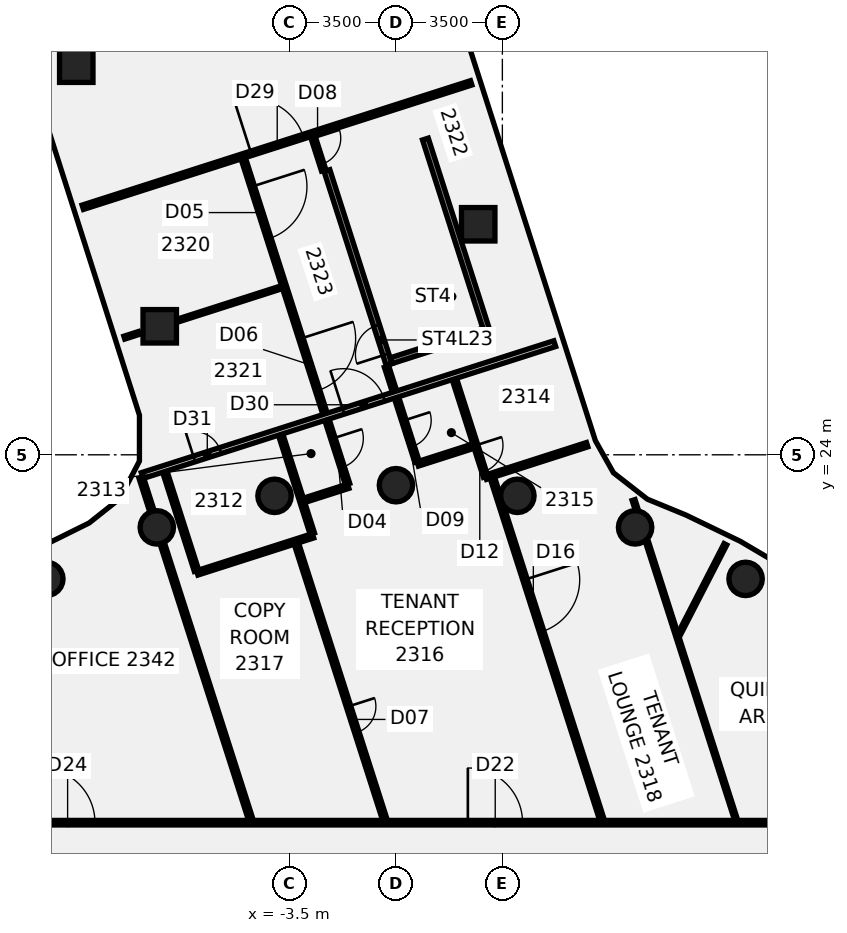
"""IFC4 building model, lengths in metres.
Left out: names, types, materials, properties, quantities, classifications, styles, units other than length and angle.
Written with IfcOpenShell. Run it as: python <this file> out.ifc"""

import sys

from ifc_helpers import new_model, si_unit, direction, frame, frame_2d, origin, origin_2d, place, context, subcontext, project, spatial, polyline, rectangle, circle, outline, extrude, element, fill, save


model = new_model("IFC4")
c1 = context("Model", 3, precision=1e-05, world=origin(), true_north=direction((0.0, 1.0)))
c2 = subcontext(c1, "Body", "Model", "MODEL_VIEW")
j1 = project(units=[si_unit("LENGTHUNIT", "METRE"), si_unit("PLANEANGLEUNIT", "RADIAN")], contexts=[c1])
p1 = place(None, origin())
s1 = spatial("IfcSite", under=j1, at=p1, CompositionType="ELEMENT")
p2 = place(p1, origin())
s2 = spatial("IfcBuilding", under=s1, at=p2, CompositionType="ELEMENT")
p3 = place(p2, frame((0.0, 0.0, 98.5)))
s3 = spatial("IfcBuildingStorey", under=s2, at=p3, CompositionType="ELEMENT", Elevation=98.5)
for number, where, z_axis, x_axis in (
    (1, (11.5, 19.919, -0.14), (0.0, 0.0, 1.0), (1.0, 0.0, 0.0)),
    (2, (7.866, 21.613, -0.14), (0.0, 0.0, 1.0), (1.0, 0.0, 0.0)),
    (3, (3.994, 22.651, -0.14), (0.0, 0.0, 1.0), (1.0, 0.0, 0.0)),
    (4, (0.0, 23.0, -0.14), (0.0, 0.0, 1.0), (1.0, 0.0, 0.0)),
    (5, (-3.994, 22.651, -0.14), (0.0, 0.0, 1.0), (1.0, 0.0, 0.0)),
    (6, (-7.866, 21.613, -0.14), (0.0, 0.0, 1.0), (1.0, 0.0, 0.0)),
    (7, (-11.5, 19.919, -0.14), (0.0, 0.0, 1.0), (1.0, 0.0, 0.0)),
):
    element("IfcColumn", number, at=place(p3, frame(where, z_axis=z_axis, x_axis=x_axis)), inside=s3, PredefinedType="COLUMN", context=c2, shape_type="SweptSolid", body=[
        extrude(circle(Radius=0.55, at=origin_2d()), origin(), (0.0, 0.0, 1.0), 3.75),
    ])
p4 = place(p3, frame((-10.515, 36.797, -0.138), z_axis=(-0.071203111001, -0.051536253541, 0.996129575685), x_axis=(0.949481128997, 0.302506380728, 0.083519310928)))
e8 = element("IfcColumn", 8, at=p4, inside=s3, PredefinedType="COLUMN", context=c2, shape_type="SweptSolid", body=[
    extrude(rectangle(XDim=1.1, YDim=1.1, at=origin_2d()), origin(), (0.0, 0.0, 1.0), 3.761),
])
for number, where, z_axis, x_axis in (
    (9, (-7.77, 28.227, -0.139), (-0.03, -0.038, 0.999), (0.952, 0.304, 0.04)),
    (10, (2.706, 31.582, -0.139), (-0.047, 0.013, 0.999), (0.305, -0.952, 0.026)),
):
    element("IfcColumn", number, at=place(p3, frame(where, z_axis=z_axis, x_axis=x_axis)), inside=s3, PredefinedType="COLUMN", context=c2, shape_type="SweptSolid", body=[
        extrude(rectangle(XDim=1.1, YDim=1.1, at=origin_2d()), origin(), (0.0, 0.0, 1.0), 3.752),
    ])
p5 = place(p3, frame((-8.381, 23.251, 0.0), z_axis=(0.0, 0.0, 1.0), x_axis=(0.305122152519, -0.952313221604, 0.0)))
e11 = element("IfcWall", 11, at=p5, inside=s3, PredefinedType="PARTITIONING", context=c2, shape_type="SweptSolid", body=[
    extrude(rectangle(XDim=1.176, YDim=0.15, at=frame_2d((0.588, 0.0))), origin(), (0.0, 0.0, 1.0), 3.01),
])
p6 = place(p3, frame((-7.692, 21.1, 0.0), z_axis=(0.0, 0.0, 1.0), x_axis=(0.305022732323, -0.952345070217, 0.0)))
e12 = element("IfcWall", 12, at=p6, inside=s3, PredefinedType="PARTITIONING", context=c2, shape_type="SweptSolid", body=[
    extrude(rectangle(XDim=9.575, YDim=0.15, at=frame_2d((4.788, 0.0))), origin(), (0.0, 0.0, 1.0), 3.01),
])
p7 = place(p3, frame((-7.604, 23.449, 0.0), z_axis=(0.0, 0.0, 1.0), x_axis=(0.305062851341, -0.952332219728, 0.0)))
e13 = element("IfcWall", 13, at=p7, inside=s3, PredefinedType="PARTITIONING", context=c2, shape_type="SweptSolid", body=[
    extrude(rectangle(XDim=3.425, YDim=0.15, at=frame_2d((1.712, 0.0))), origin(), (0.0, 0.0, 1.0), 3.01),
])
p8 = place(p3, frame((-5.025, 33.753, 0.0), z_axis=(0.0, 0.0, 1.0), x_axis=(0.305060744487, -0.952332894619, 0.0)))
e14 = element("IfcWall", 14, at=p8, inside=s3, PredefinedType="PARTITIONING", context=c2, shape_type="SweptSolid", body=[
    extrude(rectangle(XDim=11.251, YDim=0.15, at=frame_2d((5.625, 0.0))), origin(), (0.0, 0.0, 1.0), 3.01),
])
p9 = place(p8, frame((9.675, 0.0, 0.0)))
e15 = element("IfcOpeningElement", 15, at=p9, cuts=e14, PredefinedType="OPENING", context=c2, shape_type="SweptSolid", body=[
    extrude(rectangle(XDim=1.0, YDim=2.1, at=frame_2d((0.5, 1.05))), frame((0.0, 0.085, 0.0), z_axis=(0.0, -1.0, 0.0), x_axis=(1.0, 0.0, 0.0)), (0.0, 0.0, 1.0), 0.17),
])
p10 = place(p8, frame((0.975, 0.0, 0.0)))
e16 = element("IfcOpeningElement", 16, at=p10, cuts=e14, PredefinedType="OPENING", context=c2, shape_type="SweptSolid", body=[
    extrude(rectangle(XDim=1.8, YDim=2.1, at=frame_2d((0.9, 1.05))), frame((0.0, 0.085, 0.0), z_axis=(0.0, -1.0, 0.0), x_axis=(1.0, 0.0, 0.0)), (0.0, 0.0, 1.0), 0.17),
])
p11 = place(p8, frame((6.226, 0.0, 0.0)))
e17 = element("IfcOpeningElement", 17, at=p11, cuts=e14, PredefinedType="OPENING", context=c2, shape_type="SweptSolid", body=[
    extrude(rectangle(XDim=1.8, YDim=2.1, at=frame_2d((0.9, 1.05))), frame((0.0, 0.085, 0.0), z_axis=(0.0, -1.0, 0.0), x_axis=(1.0, 0.0, 0.0)), (0.0, 0.0, 1.0), 0.17),
])
p12 = place(p3, frame((-3.794, 24.665, 0.0), z_axis=(0.0, 0.0, 1.0), x_axis=(0.304920755811, -0.95237772584, 0.0)))
e18 = element("IfcWall", 18, at=p12, inside=s3, PredefinedType="PARTITIONING", context=c2, shape_type="SweptSolid", body=[
    extrude(rectangle(XDim=3.42, YDim=0.15, at=frame_2d((1.71, 0.0))), origin(), (0.0, 0.0, 1.0), 3.01),
])
p13 = place(p3, frame((-3.276, 21.082, 0.0), z_axis=(0.0, 0.0, 1.0), x_axis=(0.305069571087, -0.952330067149, 0.0)))
e19 = element("IfcWall", 19, at=p13, inside=s3, PredefinedType="PARTITIONING", context=c2, shape_type="SweptSolid", body=[
    extrude(rectangle(XDim=9.556, YDim=0.15, at=frame_2d((4.778, 0.0))), origin(), (0.0, 0.0, 1.0), 3.01),
])
p14 = place(p13, frame((5.625, 0.0, 0.0)))
e20 = element("IfcOpeningElement", 20, at=p14, cuts=e19, PredefinedType="OPENING", context=c2, shape_type="SweptSolid", body=[
    extrude(rectangle(XDim=0.9, YDim=2.1, at=frame_2d((0.45, 1.05))), frame((0.0, 0.085, 0.0), z_axis=(0.0, -1.0, 0.0), x_axis=(1.0, 0.0, 0.0)), (0.0, 0.0, 1.0), 0.17),
])
p15 = place(p3, frame((-2.739, 34.485, 0.0), z_axis=(0.0, 0.0, 1.0), x_axis=(0.305022327236, -0.95234519996, 0.0)))
e21 = element("IfcWall", 21, at=p15, inside=s3, PredefinedType="PARTITIONING", context=c2, shape_type="SweptSolid", body=[
    extrude(rectangle(XDim=1.185, YDim=0.15, at=frame_2d((0.593, 0.0))), origin(), (0.0, 0.0, 1.0), 3.01),
])
p16 = place(p15, frame((0.075, 0.0, 0.0)))
e22 = element("IfcOpeningElement", 22, at=p16, cuts=e21, PredefinedType="OPENING", context=c2, shape_type="SweptSolid", body=[
    extrude(rectangle(XDim=0.9, YDim=2.1, at=frame_2d((0.45, 1.05))), frame((0.0, 0.085, 0.0), z_axis=(0.0, -1.0, 0.0), x_axis=(1.0, 0.0, 0.0)), (0.0, 0.0, 1.0), 0.17),
])
p17 = place(p3, frame((-0.309, 26.9, 0.0), z_axis=(0.0, 0.0, 1.0), x_axis=(0.305150439053, -0.952304158106, 0.0)))
e23 = element("IfcWall", 23, at=p17, inside=s3, PredefinedType="PARTITIONING", context=c2, shape_type="SweptSolid", body=[
    extrude(rectangle(XDim=3.286, YDim=0.15, at=frame_2d((1.643, 0.0))), origin(), (0.0, 0.0, 1.0), 3.01),
])
p18 = place(p17, frame((1.86, 0.0, 0.0)))
e24 = element("IfcOpeningElement", 24, at=p18, cuts=e23, PredefinedType="OPENING", context=c2, shape_type="SweptSolid", body=[
    extrude(rectangle(XDim=0.9, YDim=2.1, at=frame_2d((0.45, 1.05))), frame((0.0, 0.085, 0.0), z_axis=(0.0, -1.0, 0.0), x_axis=(1.0, 0.0, 0.0)), (0.0, 0.0, 1.0), 0.17),
])
p19 = place(p3, frame((1.921, 26.49, 0.0), z_axis=(0.0, 0.0, 1.0), x_axis=(0.304991265288, -0.952355148093, 0.0)))
e25 = element("IfcWall", 25, at=p19, inside=s3, PredefinedType="PARTITIONING", context=c2, shape_type="SweptSolid", body=[
    extrude(rectangle(XDim=3.37, YDim=0.15, at=frame_2d((1.685, 0.0))), origin(), (0.0, 0.0, 1.0), 3.01),
])
p20 = place(p19, frame((2.29, 0.0, 0.0)))
e26 = element("IfcOpeningElement", 26, at=p20, cuts=e25, PredefinedType="OPENING", context=c2, shape_type="SweptSolid", body=[
    extrude(rectangle(XDim=0.9, YDim=2.1, at=frame_2d((0.45, 1.05))), frame((0.0, 0.085, 0.0), z_axis=(0.0, -1.0, 0.0), x_axis=(1.0, 0.0, 0.0)), (0.0, 0.0, 1.0), 0.17),
])
p21 = place(p3, frame((3.169, 23.252, 0.0), z_axis=(0.0, 0.0, 1.0), x_axis=(0.305041437483, -0.952339079015, 0.0)))
e27 = element("IfcWall", 27, at=p21, inside=s3, PredefinedType="PARTITIONING", context=c2, shape_type="SweptSolid", body=[
    extrude(rectangle(XDim=11.835, YDim=0.15, at=frame_2d((5.917, 0.0))), origin(), (0.0, 0.0, 1.0), 3.01),
])
p22 = place(p21, frame((3.525, 0.0, 0.0)))
e28 = element("IfcOpeningElement", 28, at=p22, cuts=e27, PredefinedType="OPENING", context=c2, shape_type="SweptSolid", body=[
    extrude(rectangle(XDim=1.8, YDim=2.1, at=frame_2d((0.9, 1.05))), frame((0.0, 0.085, 0.0), z_axis=(0.0, -1.0, 0.0), x_axis=(1.0, 0.0, 0.0)), (0.0, 0.0, 1.0), 0.17),
])
p23 = place(p3, frame((7.816, 22.512, 0.0), z_axis=(0.0, 0.0, 1.0), x_axis=(0.304657370026, -0.952462013357, 0.0)))
e29 = element("IfcWall", 29, at=p23, inside=s3, PredefinedType="PARTITIONING", context=c2, shape_type="SweptSolid", body=[
    extrude(rectangle(XDim=0.374, YDim=0.1, at=frame_2d((0.187, 0.0))), origin(), (0.0, 0.0, 1.0), 3.01),
])
p24 = place(p3, frame((8.232, 21.214, 0.0), z_axis=(0.0, 0.0, 1.0), x_axis=(0.305097010863, -0.952321276651, 0.0)))
e30 = element("IfcWall", 30, at=p24, inside=s3, PredefinedType="PARTITIONING", context=c2, shape_type="SweptSolid", body=[
    extrude(rectangle(XDim=9.705, YDim=0.1, at=frame_2d((4.853, 0.0))), origin(), (0.0, 0.0, 1.0), 3.01),
])
p25 = place(p3, frame((-17.065, 11.9, 0.0), z_axis=(0.0, 0.0, 1.0), x_axis=(1.0, 0.0, 0.0)))
e31 = element("IfcWall", 31, at=p25, inside=s3, PredefinedType="PARTITIONING", context=c2, shape_type="SweptSolid", body=[
    extrude(rectangle(XDim=34.165, YDim=0.15, at=frame_2d((17.083, 0.0))), origin(), (0.0, 0.0, 1.0), 3.01),
])
p26 = place(p25, frame((19.43, 0.0, 0.0)))
e32 = element("IfcOpeningElement", 32, at=p26, cuts=e31, PredefinedType="OPENING", context=c2, shape_type="SweptSolid", body=[
    extrude(rectangle(XDim=1.8, YDim=2.1, at=frame_2d((0.9, 1.05))), frame((0.0, 0.085, 0.0), z_axis=(0.0, -1.0, 0.0), x_axis=(1.0, 0.0, 0.0)), (0.0, 0.0, 1.0), 0.17),
])
p27 = place(p25, frame((30.831, 0.0, 0.0)))
e33 = element("IfcOpeningElement", 33, at=p27, cuts=e31, PredefinedType="OPENING", context=c2, shape_type="SweptSolid", body=[
    extrude(rectangle(XDim=1.8, YDim=2.1, at=frame_2d((0.9, 1.05))), frame((0.0, 0.085, 0.0), z_axis=(0.0, -1.0, 0.0), x_axis=(1.0, 0.0, 0.0)), (0.0, 0.0, 1.0), 0.17),
])
p28 = place(p25, frame((5.365, 0.0, 0.0)))
e34 = element("IfcOpeningElement", 34, at=p28, cuts=e31, PredefinedType="OPENING", context=c2, shape_type="SweptSolid", body=[
    extrude(rectangle(XDim=1.8, YDim=2.1, at=frame_2d((0.9, 1.05))), frame((0.0, 0.085, 0.0), z_axis=(0.0, -1.0, 0.0), x_axis=(1.0, 0.0, 0.0)), (0.0, 0.0, 1.0), 0.17),
])
p29 = place(p3, frame((-10.302, 32.141, 0.0), z_axis=(0.0, 0.0, 1.0), x_axis=(0.952330286707, 0.305068885698, 0.0)))
e35 = element("IfcWall", 35, at=p29, inside=s3, PredefinedType="PARTITIONING", context=c2, shape_type="SweptSolid", body=[
    extrude(rectangle(XDim=13.416, YDim=0.15, at=frame_2d((6.708, 0.0))), origin(), (0.0, 0.0, 1.0), 3.01),
])
p30 = place(p29, frame((5.816, 0.0, 0.0)))
e36 = element("IfcOpeningElement", 36, at=p30, cuts=e35, PredefinedType="OPENING", context=c2, shape_type="SweptSolid", body=[
    extrude(rectangle(XDim=1.8, YDim=2.1, at=frame_2d((0.9, 1.05))), frame((0.0, 0.085, 0.0), z_axis=(0.0, -1.0, 0.0), x_axis=(1.0, 0.0, 0.0)), (0.0, 0.0, 1.0), 0.17),
])
p31 = place(p3, frame((-8.935, 27.854, 0.0), z_axis=(0.0, 0.0, 1.0), x_axis=(0.952497435908, 0.304546604954, 0.0)))
e37 = element("IfcWall", 37, at=p31, inside=s3, PredefinedType="PARTITIONING", context=c2, shape_type="SweptSolid", body=[
    extrude(rectangle(XDim=0.503, YDim=0.1, at=frame_2d((0.251, 0.0))), origin(), (0.0, 0.0, 1.0), 3.01),
])
p32 = place(p3, frame((-7.222, 28.402, 0.0), z_axis=(0.0, 0.0, 1.0), x_axis=(0.952337113956, 0.305047572326, 0.0)))
e38 = element("IfcWall", 38, at=p32, inside=s3, PredefinedType="PARTITIONING", context=c2, shape_type="SweptSolid", body=[
    extrude(rectangle(XDim=3.649, YDim=0.1, at=frame_2d((1.825, 0.0))), origin(), (0.0, 0.0, 1.0), 3.01),
])
p33 = place(p3, frame((-8.347, 23.316, 0.0), z_axis=(0.0, 0.0, 1.0), x_axis=(0.952486806013, 0.304579848925, 0.0)))
e39 = element("IfcWall", 39, at=p33, inside=s3, PredefinedType="PARTITIONING", context=c2, shape_type="SweptSolid", body=[
    extrude(rectangle(XDim=14.246, YDim=0.2, at=frame_2d((7.123, 0.0))), origin(), (0.0, 0.0, 1.0), 3.01),
])
p34 = place(p33, frame((6.948, 0.0, 0.0)))
e40 = element("IfcOpeningElement", 40, at=p34, cuts=e39, PredefinedType="OPENING", context=c2, shape_type="SweptSolid", body=[
    extrude(rectangle(XDim=1.4, YDim=2.1, at=frame_2d((0.7, 1.05))), frame((0.0, 0.11, 0.0), z_axis=(0.0, -1.0, 0.0), x_axis=(1.0, 0.0, 0.0)), (0.0, 0.0, 1.0), 0.22),
])
p35 = place(p33, frame((1.797, 0.0, 0.0)))
e41 = element("IfcOpeningElement", 41, at=p35, cuts=e39, PredefinedType="OPENING", context=c2, shape_type="SweptSolid", body=[
    extrude(rectangle(XDim=0.9, YDim=2.1, at=frame_2d((0.45, 1.05))), frame((0.0, 0.11, 0.0), z_axis=(0.0, -1.0, 0.0), x_axis=(1.0, 0.0, 0.0)), (0.0, 0.0, 1.0), 0.22),
])
p36 = place(p3, frame((-6.537, 20.116, 0.0), z_axis=(0.0, 0.0, 1.0), x_axis=(0.952346864174, 0.305017131155, 0.0)))
e42 = element("IfcWall", 42, at=p36, inside=s3, PredefinedType="PARTITIONING", context=c2, shape_type="SweptSolid", body=[
    extrude(rectangle(XDim=4.0, YDim=0.15, at=frame_2d((2.0, 0.0))), origin(), (0.0, 0.0, 1.0), 3.01),
])
p37 = place(p3, frame((-3.023, 22.502, 0.0), z_axis=(0.0, 0.0, 1.0), x_axis=(0.952377673585, 0.304920919022, 0.0)))
e43 = element("IfcWall", 43, at=p37, inside=s3, PredefinedType="PARTITIONING", context=c2, shape_type="SweptSolid", body=[
    extrude(rectangle(XDim=1.525, YDim=0.15, at=frame_2d((0.763, 0.0))), origin(), (0.0, 0.0, 1.0), 3.01),
])
p38 = place(p3, frame((0.716, 23.699, 0.0), z_axis=(0.0, 0.0, 1.0), x_axis=(0.952375473104, 0.304927791829, 0.0)))
e44 = element("IfcWall", 44, at=p38, inside=s3, PredefinedType="PARTITIONING", context=c2, shape_type="SweptSolid", body=[
    extrude(rectangle(XDim=1.922, YDim=0.15, at=frame_2d((0.961, 0.0))), origin(), (0.0, 0.0, 1.0), 3.01),
])
p39 = place(p3, frame((2.956, 23.262, 0.0), z_axis=(0.0, 0.0, 1.0), x_axis=(0.952125735473, 0.30570669579, 0.0)))
e45 = element("IfcWall", 45, at=p39, inside=s3, PredefinedType="PARTITIONING", context=c2, shape_type="SweptSolid", body=[
    extrude(rectangle(XDim=3.501, YDim=0.15, at=frame_2d((1.75, 0.0))), origin(), (0.0, 0.0, 1.0), 3.01),
])
p40 = place(p3, frame((9.309, 18.089, 0.0), z_axis=(0.0, 0.0, 1.0), x_axis=(0.457657037475, 0.889128807344, 0.0)))
e46 = element("IfcWall", 46, at=p40, inside=s3, PredefinedType="PARTITIONING", context=c2, shape_type="SweptSolid", body=[
    extrude(rectangle(XDim=3.338, YDim=0.1, at=frame_2d((1.669, 0.0))), origin(), (0.0, 0.0, 1.0), 3.01),
])
p41 = place(p3, frame((-0.226, 26.968, -0.14), z_axis=(0.0, 0.0, 1.0), x_axis=(-0.305033541309, 0.952341608183, 0.0)))
e47 = element("IfcWall", 47, at=p41, inside=s3, PredefinedType="SHEAR", context=c2, shape_type="SweptSolid", body=[
    extrude(rectangle(XDim=6.7, YDim=0.2, at=frame_2d((3.35, 0.0))), origin(), (0.0, 0.0, 1.0), 3.15),
])
p42 = place(p41, frame((0.35, 0.0, 0.0)))
e48 = element("IfcOpeningElement", 48, at=p42, cuts=e47, PredefinedType="OPENING", context=c2, shape_type="SweptSolid", body=[
    extrude(rectangle(XDim=1.0, YDim=2.1, at=frame_2d((0.5, 1.05))), frame((0.0, 0.11, 0.0), z_axis=(0.0, -1.0, 0.0), x_axis=(1.0, 0.0, 0.0)), (0.0, 0.0, 1.0), 0.22),
])
p43 = place(p3, frame((3.012, 28.005, -0.14), z_axis=(0.0, 0.0, 1.0), x_axis=(-0.305066589564, 0.952331022246, 0.0)))
e49 = element("IfcWall", 49, at=p43, inside=s3, PredefinedType="SHEAR", context=c2, shape_type="SweptSolid", body=[
    extrude(rectangle(XDim=6.7, YDim=0.2, at=frame_2d((3.35, 0.0))), origin(), (0.0, 0.0, 1.0), 3.15),
])
p44 = place(p3, frame((2.886, 28.07, -0.14), z_axis=(0.0, 0.0, 1.0), x_axis=(-0.952347936583, -0.305013782781, 0.0)))
e50 = element("IfcWall", 50, at=p44, inside=s3, PredefinedType="SHEAR", context=c2, shape_type="SweptSolid", body=[
    extrude(rectangle(XDim=3.2, YDim=0.2, at=frame_2d((1.6, 0.0))), origin(), (0.0, 0.0, 1.0), 3.15),
])
p45 = place(p3, frame((0.0, 0.0, -0.14)))
e51 = element("IfcWall", 51, at=p45, inside=s3, PredefinedType="SHEAR", context=c2, shape_type="SweptSolid", body=[
    extrude(outline(polyline([(0.934, 34.165), (0.873, 34.355), (-2.175, 33.379), (-2.114, 33.188), (0.934, 34.165)])), origin(), (0.0, 0.0, 1.0), 3.15),
])
p46 = place(p9, frame((1.0, 0.0, 0.0), z_axis=(0.0, 0.0, 1.0), x_axis=(-1.0, 0.0, 0.0)))
e52 = element("IfcDoor", 52, at=p46, inside=s3, OperationType="SINGLE_SWING_RIGHT", PredefinedType="DOOR", context=c2, shape_type="SweptSolid", body=[
    extrude(rectangle(XDim=1.0, YDim=2.1, at=frame_2d((0.5, 1.05))), frame((0.0, 0.025, 0.0), z_axis=(0.0, -1.0, 0.0), x_axis=(1.0, 0.0, 0.0)), (0.0, 0.0, 1.0), 0.05),
])
fill(e15, e52)
p47 = place(p10, frame((1.8, 0.0, 0.0), z_axis=(0.0, 0.0, 1.0), x_axis=(-1.0, 0.0, 0.0)))
e53 = element("IfcDoor", 53, at=p47, inside=s3, OperationType="DOUBLE_DOOR_SINGLE_SWING", PredefinedType="DOOR", context=c2, shape_type="SweptSolid", body=[
    extrude(rectangle(XDim=1.8, YDim=2.1, at=frame_2d((0.9, 1.05))), frame((0.0, 0.025, 0.0), z_axis=(0.0, -1.0, 0.0), x_axis=(1.0, 0.0, 0.0)), (0.0, 0.0, 1.0), 0.05),
])
fill(e16, e53)
p48 = place(p11, frame((1.8, 0.0, 0.0), z_axis=(0.0, 0.0, 1.0), x_axis=(-1.0, 0.0, 0.0)))
e54 = element("IfcDoor", 54, at=p48, inside=s3, OperationType="DOUBLE_DOOR_SINGLE_SWING", PredefinedType="DOOR", context=c2, shape_type="SweptSolid", body=[
    extrude(rectangle(XDim=1.8, YDim=2.1, at=frame_2d((0.9, 1.05))), frame((0.0, 0.025, 0.0), z_axis=(0.0, -1.0, 0.0), x_axis=(1.0, 0.0, 0.0)), (0.0, 0.0, 1.0), 0.05),
])
fill(e17, e54)
p49 = place(p14, frame((0.9, 0.0, 0.0), z_axis=(0.0, 0.0, 1.0), x_axis=(-1.0, 0.0, 0.0)))
e55 = element("IfcDoor", 55, at=p49, inside=s3, OperationType="SINGLE_SWING_RIGHT", PredefinedType="DOOR", context=c2, shape_type="SweptSolid", body=[
    extrude(rectangle(XDim=0.9, YDim=2.1, at=frame_2d((0.45, 1.05))), frame((0.0, 0.025, 0.0), z_axis=(0.0, -1.0, 0.0), x_axis=(1.0, 0.0, 0.0)), (0.0, 0.0, 1.0), 0.05),
])
fill(e20, e55)
p50 = place(p16, origin())
e56 = element("IfcDoor", 56, at=p50, inside=s3, OperationType="SINGLE_SWING_RIGHT", PredefinedType="DOOR", context=c2, shape_type="SweptSolid", body=[
    extrude(rectangle(XDim=0.9, YDim=2.1, at=frame_2d((0.45, 1.05))), frame((0.0, 0.025, 0.0), z_axis=(0.0, -1.0, 0.0), x_axis=(1.0, 0.0, 0.0)), (0.0, 0.0, 1.0), 0.05),
])
fill(e22, e56)
p51 = place(p18, origin())
e57 = element("IfcDoor", 57, at=p51, inside=s3, OperationType="SINGLE_SWING_LEFT", PredefinedType="DOOR", context=c2, shape_type="SweptSolid", body=[
    extrude(rectangle(XDim=0.9, YDim=2.1, at=frame_2d((0.45, 1.05))), frame((0.0, 0.025, 0.0), z_axis=(0.0, -1.0, 0.0), x_axis=(1.0, 0.0, 0.0)), (0.0, 0.0, 1.0), 0.05),
])
fill(e24, e57)
p52 = place(p20, origin())
e58 = element("IfcDoor", 58, at=p52, inside=s3, OperationType="SINGLE_SWING_LEFT", PredefinedType="DOOR", context=c2, shape_type="SweptSolid", body=[
    extrude(rectangle(XDim=0.9, YDim=2.1, at=frame_2d((0.45, 1.05))), frame((0.0, 0.025, 0.0), z_axis=(0.0, -1.0, 0.0), x_axis=(1.0, 0.0, 0.0)), (0.0, 0.0, 1.0), 0.05),
])
fill(e26, e58)
p53 = place(p22, origin())
e59 = element("IfcDoor", 59, at=p53, inside=s3, OperationType="DOUBLE_DOOR_SINGLE_SWING", PredefinedType="DOOR", context=c2, shape_type="SweptSolid", body=[
    extrude(rectangle(XDim=1.8, YDim=2.1, at=frame_2d((0.9, 1.05))), frame((0.0, 0.025, 0.0), z_axis=(0.0, -1.0, 0.0), x_axis=(1.0, 0.0, 0.0)), (0.0, 0.0, 1.0), 0.05),
])
fill(e28, e59)
p54 = place(p26, frame((1.8, 0.0, 0.0), z_axis=(0.0, 0.0, 1.0), x_axis=(-1.0, 0.0, 0.0)))
e60 = element("IfcDoor", 60, at=p54, inside=s3, OperationType="DOUBLE_DOOR_SINGLE_SWING", PredefinedType="DOOR", context=c2, shape_type="SweptSolid", body=[
    extrude(rectangle(XDim=1.8, YDim=2.1, at=frame_2d((0.9, 1.05))), frame((0.0, 0.025, 0.0), z_axis=(0.0, -1.0, 0.0), x_axis=(1.0, 0.0, 0.0)), (0.0, 0.0, 1.0), 0.05),
])
fill(e32, e60)
p55 = place(p28, origin())
e61 = element("IfcDoor", 61, at=p55, inside=s3, OperationType="DOUBLE_DOOR_SINGLE_SWING", PredefinedType="DOOR", context=c2, shape_type="SweptSolid", body=[
    extrude(rectangle(XDim=1.8, YDim=2.1, at=frame_2d((0.9, 1.05))), frame((0.0, 0.025, 0.0), z_axis=(0.0, -1.0, 0.0), x_axis=(1.0, 0.0, 0.0)), (0.0, 0.0, 1.0), 0.05),
])
fill(e34, e61)
p56 = place(p30, origin())
e62 = element("IfcDoor", 62, at=p56, inside=s3, OperationType="DOUBLE_DOOR_SINGLE_SWING", PredefinedType="DOOR", context=c2, shape_type="SweptSolid", body=[
    extrude(rectangle(XDim=1.8, YDim=2.1, at=frame_2d((0.9, 1.05))), frame((0.0, 0.025, 0.0), z_axis=(0.0, -1.0, 0.0), x_axis=(1.0, 0.0, 0.0)), (0.0, 0.0, 1.0), 0.05),
])
fill(e36, e62)
p57 = place(p34, frame((1.4, 0.0, 0.0), z_axis=(0.0, 0.0, 1.0), x_axis=(-1.0, 0.0, 0.0)))
e63 = element("IfcDoor", 63, at=p57, inside=s3, OperationType="DOUBLE_DOOR_SINGLE_SWING", PredefinedType="DOOR", context=c2, shape_type="SweptSolid", body=[
    extrude(rectangle(XDim=1.4, YDim=2.1, at=frame_2d((0.7, 1.05))), frame((0.0, 0.025, 0.0), z_axis=(0.0, -1.0, 0.0), x_axis=(1.0, 0.0, 0.0)), (0.0, 0.0, 1.0), 0.05),
])
fill(e40, e63)
p58 = place(p35, frame((0.9, 0.0, 0.0), z_axis=(0.0, 0.0, 1.0), x_axis=(-1.0, 0.0, 0.0)))
e64 = element("IfcDoor", 64, at=p58, inside=s3, OperationType="SINGLE_SWING_LEFT", PredefinedType="DOOR", context=c2, shape_type="SweptSolid", body=[
    extrude(rectangle(XDim=0.9, YDim=2.1, at=frame_2d((0.45, 1.05))), frame((0.0, 0.025, 0.0), z_axis=(0.0, -1.0, 0.0), x_axis=(1.0, 0.0, 0.0)), (0.0, 0.0, 1.0), 0.05),
])
fill(e41, e64)
p59 = place(p42, origin())
e65 = element("IfcDoor", 65, at=p59, inside=s3, OperationType="SINGLE_SWING_LEFT", PredefinedType="DOOR", context=c2, shape_type="SweptSolid", body=[
    extrude(rectangle(XDim=1.0, YDim=2.1, at=frame_2d((0.5, 1.05))), frame((0.0, 0.025, 0.0), z_axis=(0.0, -1.0, 0.0), x_axis=(1.0, 0.0, 0.0)), (0.0, 0.0, 1.0), 0.05),
])
fill(e48, e65)
save(model, sys.argv[1])
